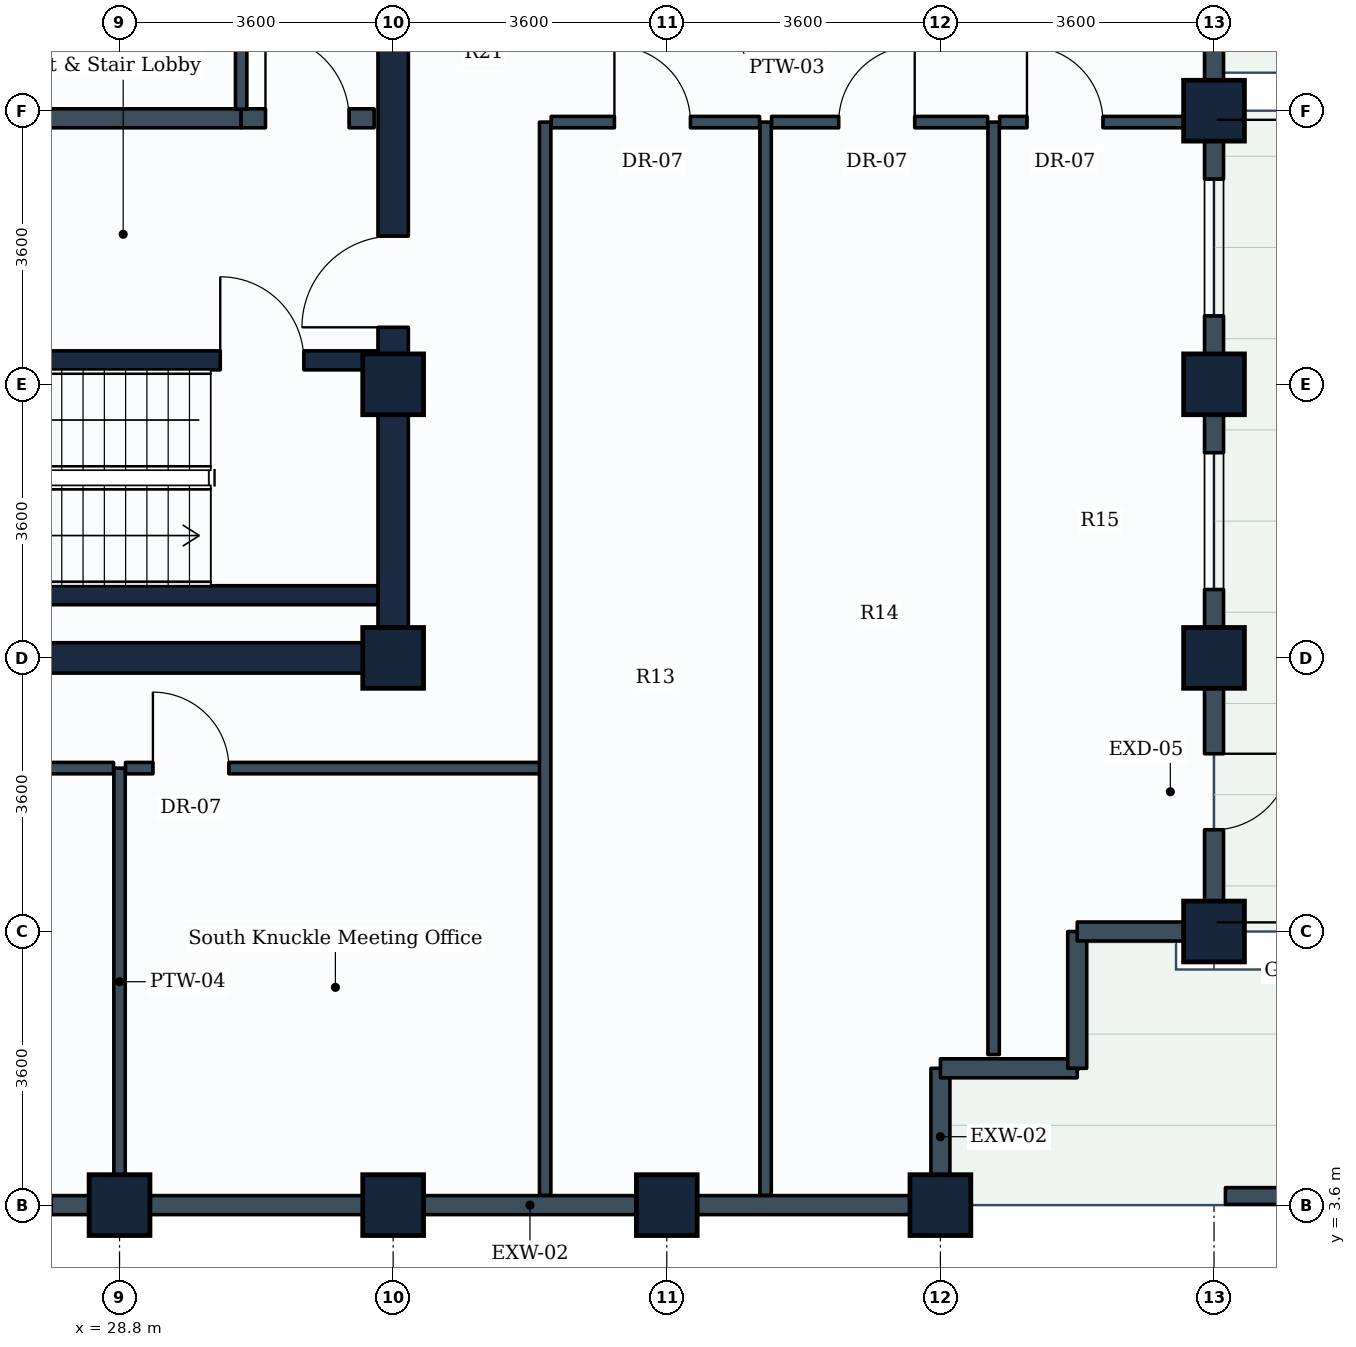
"""IFC4 building model, lengths in metres.
Left out: names, types, materials, properties, quantities, classifications, styles, units other than length and angle.
Written with IfcOpenShell. Run it as: python <this file> out.ifc"""

import sys

from ifc_helpers import new_model, si_unit, direction, frame, frame_2d, origin, origin_2d, place, context, subcontext, project, spatial, rectangle, extrude, element, fill, save


model = new_model("IFC4")
c1 = context("Model", 3, precision=1e-05, world=origin(), true_north=direction((0.0, 1.0)))
c2 = subcontext(c1, "Body", "Model", "MODEL_VIEW")
j1 = project(units=[si_unit("LENGTHUNIT", "METRE"), si_unit("PLANEANGLEUNIT", "RADIAN")], contexts=[c1])
p1 = place(None, origin())
s1 = spatial("IfcSite", under=j1, at=p1, CompositionType="ELEMENT")
p2 = place(p1, origin())
s2 = spatial("IfcBuilding", under=s1, at=p2, CompositionType="ELEMENT")
p3 = place(p2, frame((0.0, 0.0, 221.0)))
s3 = spatial("IfcBuildingStorey", under=s2, at=p3, CompositionType="ELEMENT", Elevation=221.0)
for number, where, z_axis, x_axis in (
    (1, (28.8, 3.6, 0.0), (0.0, 0.0, 1.0), (1.0, 0.0, 0.0)),
    (2, (32.4, 3.6, 0.0), (0.0, 0.0, 1.0), (1.0, 0.0, 0.0)),
    (3, (32.4, 10.8, 0.0), (0.0, 0.0, 1.0), (1.0, 0.0, 0.0)),
    (4, (32.4, 14.4, 0.0), (0.0, 0.0, 1.0), (1.0, 0.0, 0.0)),
    (5, (36.0, 3.6, 0.0), (0.0, 0.0, 1.0), (1.0, 0.0, 0.0)),
    (6, (39.6, 3.6, 0.0), (0.0, 0.0, 1.0), (1.0, 0.0, 0.0)),
    (7, (43.2, 7.2, 0.0), (0.0, 0.0, 1.0), (1.0, 0.0, 0.0)),
    (8, (43.2, 10.8, 0.0), (0.0, 0.0, 1.0), (0.0, 1.0, 0.0)),
    (9, (43.2, 14.4, 0.0), (0.0, 0.0, 1.0), (0.0, 1.0, 0.0)),
    (10, (43.2, 18.0, 0.0), (0.0, 0.0, 1.0), (0.0, 1.0, 0.0)),
):
    element("IfcColumn", number, at=place(p3, frame(where, z_axis=z_axis, x_axis=x_axis)), inside=s3, PredefinedType="COLUMN", context=c2, shape_type="SweptSolid", body=[
        extrude(rectangle(XDim=0.8, YDim=0.8, at=origin_2d()), origin(), (0.0, 0.0, 1.0), 3.6),
    ])
p4 = place(p3, frame((43.35, 3.72, 0.0), z_axis=(0.0, 0.0, 1.0), x_axis=(1.0, 0.0, 0.0)))
e11 = element("IfcWall", 11, at=p4, inside=s3, PredefinedType="PARAPET", context=c2, shape_type="SweptSolid", body=[
    extrude(rectangle(XDim=3.45, YDim=0.22, at=frame_2d((1.725, 0.0))), origin(), (0.0, 0.0, 1.0), 1.15),
])
p5 = place(p3, frame((28.8, 3.6, 0.0), z_axis=(0.0, 0.0, 1.0), x_axis=(-1.0, 0.0, 0.0)))
e12 = element("IfcWall", 12, at=p5, inside=s3, PredefinedType="STANDARD", context=c2, shape_type="SweptSolid", body=[
    extrude(rectangle(XDim=3.6, YDim=0.25, at=frame_2d((1.8, 0.0))), origin(), (0.0, 0.0, 1.0), 2.83),
])
p6 = place(p5, frame((0.9, 0.0, 0.85)))
e13 = element("IfcOpeningElement", 13, at=p6, cuts=e12, PredefinedType="OPENING", context=c2, shape_type="SweptSolid", body=[
    extrude(rectangle(XDim=1.8, YDim=1.35, at=frame_2d((0.9, 0.675))), frame((0.0, 0.135, 0.0), z_axis=(0.0, -1.0, 0.0), x_axis=(1.0, 0.0, 0.0)), (0.0, 0.0, 1.0), 0.27),
])
p7 = place(p3, frame((32.4, 3.6, 0.0), z_axis=(0.0, 0.0, 1.0), x_axis=(-1.0, 0.0, 0.0)))
e14 = element("IfcWall", 14, at=p7, inside=s3, PredefinedType="STANDARD", context=c2, shape_type="SweptSolid", body=[
    extrude(rectangle(XDim=3.6, YDim=0.25, at=frame_2d((1.8, 0.0))), origin(), (0.0, 0.0, 1.0), 2.83),
])
for number, where, z_axis, x_axis in (
    (15, (36.0, 3.6, 0.0), (0.0, 0.0, 1.0), (-1.0, 0.0, 0.0)),
    (16, (39.6, 3.6, 0.0), (0.0, 0.0, 1.0), (-1.0, 0.0, 0.0)),
):
    element("IfcWall", number, at=place(p3, frame(where, z_axis=z_axis, x_axis=x_axis)), inside=s3, PredefinedType="STANDARD", context=c2, shape_type="SweptSolid", body=[
        extrude(rectangle(XDim=3.6, YDim=0.25, at=frame_2d((1.8, 0.0))), origin(), (0.0, 0.0, 1.0), 2.83),
    ])
p8 = place(p3, frame((39.6, 5.4, 0.0), z_axis=(0.0, 0.0, 1.0), x_axis=(0.0, -1.0, 0.0)))
e17 = element("IfcWall", 17, at=p8, inside=s3, PredefinedType="STANDARD", context=c2, shape_type="SweptSolid", body=[
    extrude(rectangle(XDim=1.8, YDim=0.25, at=frame_2d((0.9, 0.0))), origin(), (0.0, 0.0, 1.0), 2.83),
])
p9 = place(p3, frame((41.4, 5.4, 0.0), z_axis=(0.0, 0.0, 1.0), x_axis=(-1.0, 0.0, 0.0)))
e18 = element("IfcWall", 18, at=p9, inside=s3, PredefinedType="STANDARD", context=c2, shape_type="SweptSolid", body=[
    extrude(rectangle(XDim=1.8, YDim=0.25, at=frame_2d((0.9, 0.0))), origin(), (0.0, 0.0, 1.0), 3.335),
])
p10 = place(p3, frame((41.4, 7.2, 0.0), z_axis=(0.0, 0.0, 1.0), x_axis=(0.0, -1.0, 0.0)))
e19 = element("IfcWall", 19, at=p10, inside=s3, PredefinedType="STANDARD", context=c2, shape_type="SweptSolid", body=[
    extrude(rectangle(XDim=1.8, YDim=0.25, at=frame_2d((0.9, 0.0))), origin(), (0.0, 0.0, 1.0), 3.335),
])
p11 = place(p3, frame((43.2, 7.2, 0.0), z_axis=(0.0, 0.0, 1.0), x_axis=(-1.0, 0.0, 0.0)))
e20 = element("IfcWall", 20, at=p11, inside=s3, PredefinedType="STANDARD", context=c2, shape_type="SweptSolid", body=[
    extrude(rectangle(XDim=1.8, YDim=0.25, at=frame_2d((0.9, 0.0))), origin(), (0.0, 0.0, 1.0), 2.83),
])
p12 = place(p3, frame((43.2, 10.8, 0.0), z_axis=(0.0, 0.0, 1.0), x_axis=(0.0, -1.0, 0.0)))
e21 = element("IfcWall", 21, at=p12, inside=s3, PredefinedType="STANDARD", context=c2, shape_type="SweptSolid", body=[
    extrude(rectangle(XDim=3.6, YDim=0.25, at=frame_2d((1.8, 0.0))), origin(), (0.0, 0.0, 1.0), 2.83),
])
p13 = place(p12, frame((1.261, 0.0, 0.0)))
e22 = element("IfcOpeningElement", 22, at=p13, cuts=e21, PredefinedType="OPENING", context=c2, shape_type="SweptSolid", body=[
    extrude(rectangle(XDim=1.0, YDim=2.1, at=frame_2d((0.5, 1.05))), frame((0.0, 0.135, 0.0), z_axis=(0.0, -1.0, 0.0), x_axis=(1.0, 0.0, 0.0)), (0.0, 0.0, 1.0), 0.27),
])
p14 = place(p3, frame((43.2, 14.4, 0.0), z_axis=(0.0, 0.0, 1.0), x_axis=(0.0, -1.0, 0.0)))
e23 = element("IfcWall", 23, at=p14, inside=s3, PredefinedType="STANDARD", context=c2, shape_type="SweptSolid", body=[
    extrude(rectangle(XDim=3.6, YDim=0.25, at=frame_2d((1.8, 0.0))), origin(), (0.0, 0.0, 1.0), 2.83),
])
p15 = place(p14, frame((0.9, 0.0, 0.85)))
e24 = element("IfcOpeningElement", 24, at=p15, cuts=e23, PredefinedType="OPENING", context=c2, shape_type="SweptSolid", body=[
    extrude(rectangle(XDim=1.8, YDim=1.35, at=frame_2d((0.9, 0.675))), frame((0.0, 0.135, 0.0), z_axis=(0.0, -1.0, 0.0), x_axis=(1.0, 0.0, 0.0)), (0.0, 0.0, 1.0), 0.27),
])
p16 = place(p3, frame((43.2, 18.0, 0.0), z_axis=(0.0, 0.0, 1.0), x_axis=(0.0, -1.0, 0.0)))
e25 = element("IfcWall", 25, at=p16, inside=s3, PredefinedType="STANDARD", context=c2, shape_type="SweptSolid", body=[
    extrude(rectangle(XDim=3.6, YDim=0.25, at=frame_2d((1.8, 0.0))), origin(), (0.0, 0.0, 1.0), 2.83),
])
p17 = place(p16, frame((0.9, 0.0, 0.85)))
e26 = element("IfcOpeningElement", 26, at=p17, cuts=e25, PredefinedType="OPENING", context=c2, shape_type="SweptSolid", body=[
    extrude(rectangle(XDim=1.8, YDim=1.35, at=frame_2d((0.9, 0.675))), frame((0.0, 0.135, 0.0), z_axis=(0.0, -1.0, 0.0), x_axis=(1.0, 0.0, 0.0)), (0.0, 0.0, 1.0), 0.27),
])
p18 = place(p3, frame((43.2, 21.6, 0.0), z_axis=(0.0, 0.0, 1.0), x_axis=(0.0, -1.0, 0.0)))
e27 = element("IfcWall", 27, at=p18, inside=s3, PredefinedType="STANDARD", context=c2, shape_type="SweptSolid", body=[
    extrude(rectangle(XDim=3.6, YDim=0.25, at=frame_2d((1.8, 0.0))), origin(), (0.0, 0.0, 1.0), 2.83),
])
p19 = place(p3, frame((14.4, 10.8, 0.0), z_axis=(0.0, 0.0, 1.0), x_axis=(1.0, 0.0, 0.0)))
e28 = element("IfcWall", 28, at=p19, inside=s3, PredefinedType="SHEAR", context=c2, shape_type="SweptSolid", body=[
    extrude(rectangle(XDim=18.0, YDim=0.4, at=frame_2d((9.0, 0.0))), origin(), (0.0, 0.0, 1.0), 3.35),
])
p20 = place(p3, frame((32.4, 10.8, 0.0), z_axis=(0.0, 0.0, 1.0), x_axis=(0.0, 1.0, 0.0)))
e29 = element("IfcWall", 29, at=p20, inside=s3, PredefinedType="SHEAR", context=c2, shape_type="SweptSolid", body=[
    extrude(rectangle(XDim=14.4, YDim=0.4, at=frame_2d((7.2, 0.0))), origin(), (0.0, 0.0, 1.0), 3.35),
])
p21 = place(p20, frame((4.35, 0.0, 0.0)))
e30 = element("IfcOpeningElement", 30, at=p21, cuts=e29, PredefinedType="OPENING", context=c2, shape_type="SweptSolid", body=[
    extrude(rectangle(XDim=1.2, YDim=2.1, at=frame_2d((0.6, 1.05))), frame((0.0, 0.21, 0.0), z_axis=(0.0, -1.0, 0.0), x_axis=(1.0, 0.0, 0.0)), (0.0, 0.0, 1.0), 0.42),
])
p22 = place(p20, frame((10.0, 0.0, 0.0)))
e31 = element("IfcOpeningElement", 31, at=p22, cuts=e29, PredefinedType="OPENING", context=c2, shape_type="SweptSolid", body=[
    extrude(rectangle(XDim=1.2, YDim=2.1, at=frame_2d((0.6, 1.05))), frame((0.0, 0.21, 0.0), z_axis=(0.0, -1.0, 0.0), x_axis=(1.0, 0.0, 0.0)), (0.0, 0.0, 1.0), 0.42),
])
p23 = place(p3, frame((23.35, 11.625, 0.0), z_axis=(0.0, 0.0, 1.0), x_axis=(1.0, 0.0, 0.0)))
e32 = element("IfcWall", 32, at=p23, inside=s3, PredefinedType="SHEAR", context=c2, shape_type="SweptSolid", body=[
    extrude(rectangle(XDim=8.85, YDim=0.25, at=frame_2d((4.425, 0.0))), origin(), (0.0, 0.0, 1.0), 3.35),
])
p24 = place(p3, frame((23.35, 14.715, 0.0), z_axis=(0.0, 0.0, 1.0), x_axis=(1.0, 0.0, 0.0)))
e33 = element("IfcWall", 33, at=p24, inside=s3, PredefinedType="SHEAR", context=c2, shape_type="SweptSolid", body=[
    extrude(rectangle(XDim=8.85, YDim=0.25, at=frame_2d((4.425, 0.0))), origin(), (0.0, 0.0, 1.0), 3.35),
])
p25 = place(p24, frame((6.775, 0.0, 0.0)))
e34 = element("IfcOpeningElement", 34, at=p25, cuts=e33, PredefinedType="OPENING", context=c2, shape_type="SweptSolid", body=[
    extrude(rectangle(XDim=1.1, YDim=2.1, at=frame_2d((0.55, 1.05))), frame((0.0, 0.135, 0.0), z_axis=(0.0, -1.0, 0.0), x_axis=(1.0, 0.0, 0.0)), (0.0, 0.0, 1.0), 0.27),
])
p26 = place(p3, frame((21.88, 17.9, 0.0), z_axis=(0.0, 0.0, 1.0), x_axis=(1.0, 0.0, 0.0)))
e35 = element("IfcWall", 35, at=p26, inside=s3, PredefinedType="PARTITIONING", context=c2, shape_type="SweptSolid", body=[
    extrude(rectangle(XDim=8.52, YDim=0.25, at=frame_2d((4.26, 0.0))), origin(), (0.0, 0.0, 1.0), 3.335),
])
p27 = place(p3, frame((30.4, 17.9, 0.0), z_axis=(0.0, 0.0, 1.0), x_axis=(1.0, 0.0, 0.0)))
e36 = element("IfcWall", 36, at=p27, inside=s3, PredefinedType="PARTITIONING", context=c2, shape_type="SweptSolid", body=[
    extrude(rectangle(XDim=1.75, YDim=0.25, at=frame_2d((0.875, 0.0))), origin(), (0.0, 0.0, 1.0), 3.335),
])
p28 = place(p27, frame((0.32, 0.0, 0.0)))
e37 = element("IfcOpeningElement", 37, at=p28, cuts=e36, PredefinedType="OPENING", context=c2, shape_type="SweptSolid", body=[
    extrude(rectangle(XDim=1.1, YDim=2.1, at=frame_2d((0.55, 1.05))), frame((0.0, 0.135, 0.0), z_axis=(0.0, -1.0, 0.0), x_axis=(1.0, 0.0, 0.0)), (0.0, 0.0, 1.0), 0.27),
])
p29 = place(p3, frame((30.4, 18.02, 0.0), z_axis=(0.0, 0.0, 1.0), x_axis=(0.0, 1.0, 0.0)))
e38 = element("IfcWall", 38, at=p29, inside=s3, PredefinedType="PARTITIONING", context=c2, shape_type="SweptSolid", body=[
    extrude(rectangle(XDim=3.2, YDim=0.15, at=frame_2d((1.6, 0.0))), origin(), (0.0, 0.0, 1.0), 3.335),
])
p30 = place(p3, frame((28.8, 9.35, 0.0), z_axis=(0.0, 0.0, 1.0), x_axis=(0.0, -1.0, 0.0)))
e39 = element("IfcWall", 39, at=p30, inside=s3, PredefinedType="PARTITIONING", context=c2, shape_type="SweptSolid", body=[
    extrude(rectangle(XDim=5.621, YDim=0.15, at=frame_2d((2.811, 0.0))), origin(), (0.0, 0.0, 1.0), 3.335),
])
p31 = place(p3, frame((20.479, 9.35, 0.0), z_axis=(0.0, 0.0, 1.0), x_axis=(1.0, 0.0, 0.0)))
e40 = element("IfcWall", 40, at=p31, inside=s3, PredefinedType="PARTITIONING", context=c2, shape_type="SweptSolid", body=[
    extrude(rectangle(XDim=8.242, YDim=0.15, at=frame_2d((4.121, 0.0))), origin(), (0.0, 0.0, 1.0), 3.02),
])
p32 = place(p31, frame((3.939, 0.0, 0.0)))
e41 = element("IfcOpeningElement", 41, at=p32, cuts=e40, PredefinedType="OPENING", context=c2, shape_type="SweptSolid", body=[
    extrude(rectangle(XDim=1.0, YDim=2.1, at=frame_2d((0.5, 1.05))), frame((0.0, 0.085, 0.0), z_axis=(0.0, -1.0, 0.0), x_axis=(1.0, 0.0, 0.0)), (0.0, 0.0, 1.0), 0.17),
])
p33 = place(p3, frame((28.879, 9.35, 0.0), z_axis=(0.0, 0.0, 1.0), x_axis=(1.0, 0.0, 0.0)))
e42 = element("IfcWall", 42, at=p33, inside=s3, PredefinedType="PARTITIONING", context=c2, shape_type="SweptSolid", body=[
    extrude(rectangle(XDim=5.521, YDim=0.15, at=frame_2d((2.76, 0.0))), origin(), (0.0, 0.0, 1.0), 3.335),
])
p34 = place(p33, frame((0.36, 0.0, 0.0)))
e43 = element("IfcOpeningElement", 43, at=p34, cuts=e42, PredefinedType="OPENING", context=c2, shape_type="SweptSolid", body=[
    extrude(rectangle(XDim=1.0, YDim=2.1, at=frame_2d((0.5, 1.05))), frame((0.0, 0.085, 0.0), z_axis=(0.0, -1.0, 0.0), x_axis=(1.0, 0.0, 0.0)), (0.0, 0.0, 1.0), 0.17),
])
for number, where, z_axis, x_axis in (
    (44, (34.4, 3.729, 0.0), (0.0, 0.0, 1.0), (0.0, 1.0, 0.0)),
    (45, (37.3, 3.729, 0.0), (0.0, 0.0, 1.0), (0.0, 1.0, 0.0)),
):
    element("IfcWall", number, at=place(p3, frame(where, z_axis=z_axis, x_axis=x_axis)), inside=s3, PredefinedType="PARTITIONING", context=c2, shape_type="SweptSolid", body=[
        extrude(rectangle(XDim=14.121, YDim=0.15, at=frame_2d((7.061, 0.0))), origin(), (0.0, 0.0, 1.0), 2.83),
    ])
p35 = place(p3, frame((34.479, 17.85, 0.0), z_axis=(0.0, 0.0, 1.0), x_axis=(1.0, 0.0, 0.0)))
e46 = element("IfcWall", 46, at=p35, inside=s3, PredefinedType="PARTITIONING", context=c2, shape_type="SweptSolid", body=[
    extrude(rectangle(XDim=2.742, YDim=0.15, at=frame_2d((1.371, 0.0))), origin(), (0.0, 0.0, 1.0), 3.02),
])
p36 = place(p35, frame((0.832, 0.0, 0.0)))
e47 = element("IfcOpeningElement", 47, at=p36, cuts=e46, PredefinedType="OPENING", context=c2, shape_type="SweptSolid", body=[
    extrude(rectangle(XDim=1.0, YDim=2.1, at=frame_2d((0.5, 1.05))), frame((0.0, 0.085, 0.0), z_axis=(0.0, -1.0, 0.0), x_axis=(1.0, 0.0, 0.0)), (0.0, 0.0, 1.0), 0.17),
])
p37 = place(p3, frame((40.3, 5.58, 0.0), z_axis=(0.0, 0.0, 1.0), x_axis=(0.0, 1.0, 0.0)))
e48 = element("IfcWall", 48, at=p37, inside=s3, PredefinedType="PARTITIONING", context=c2, shape_type="SweptSolid", body=[
    extrude(rectangle(XDim=12.27, YDim=0.15, at=frame_2d((6.135, 0.0))), origin(), (0.0, 0.0, 1.0), 3.03),
])
p38 = place(p3, frame((37.379, 17.85, 0.0), z_axis=(0.0, 0.0, 1.0), x_axis=(1.0, 0.0, 0.0)))
e49 = element("IfcWall", 49, at=p38, inside=s3, PredefinedType="PARTITIONING", context=c2, shape_type="SweptSolid", body=[
    extrude(rectangle(XDim=2.842, YDim=0.15, at=frame_2d((1.421, 0.0))), origin(), (0.0, 0.0, 1.0), 3.335),
])
p39 = place(p38, frame((0.883, 0.0, 0.0)))
e50 = element("IfcOpeningElement", 50, at=p39, cuts=e49, PredefinedType="OPENING", context=c2, shape_type="SweptSolid", body=[
    extrude(rectangle(XDim=1.0, YDim=2.1, at=frame_2d((0.5, 1.05))), frame((0.0, 0.085, 0.0), z_axis=(0.0, -1.0, 0.0), x_axis=(1.0, 0.0, 0.0)), (0.0, 0.0, 1.0), 0.17),
])
p40 = place(p3, frame((40.379, 17.85, 0.0), z_axis=(0.0, 0.0, 1.0), x_axis=(1.0, 0.0, 0.0)))
e51 = element("IfcWall", 51, at=p40, inside=s3, PredefinedType="PARTITIONING", context=c2, shape_type="SweptSolid", body=[
    extrude(rectangle(XDim=2.692, YDim=0.15, at=frame_2d((1.346, 0.0))), origin(), (0.0, 0.0, 1.0), 2.83),
])
p41 = place(p40, frame((0.36, 0.0, 0.0)))
e52 = element("IfcOpeningElement", 52, at=p41, cuts=e51, PredefinedType="OPENING", context=c2, shape_type="SweptSolid", body=[
    extrude(rectangle(XDim=1.0, YDim=2.1, at=frame_2d((0.5, 1.05))), frame((0.0, 0.085, 0.0), z_axis=(0.0, -1.0, 0.0), x_axis=(1.0, 0.0, 0.0)), (0.0, 0.0, 1.0), 0.17),
])
p42 = place(p13, origin())
e53 = element("IfcDoor", 53, at=p42, inside=s3, OperationType="SINGLE_SWING_LEFT", PredefinedType="DOOR", context=c2, shape_type="SweptSolid", body=[
    extrude(rectangle(XDim=1.0, YDim=2.1, at=frame_2d((0.5, 1.05))), frame((0.0, 0.025, 0.0), z_axis=(0.0, -1.0, 0.0), x_axis=(1.0, 0.0, 0.0)), (0.0, 0.0, 1.0), 0.05),
])
fill(e22, e53)
p43 = place(p15, origin())
e54 = element("IfcWindow", 54, at=p43, inside=s3, PartitioningType="SINGLE_PANEL", PredefinedType="WINDOW", context=c2, shape_type="SweptSolid", body=[
    extrude(rectangle(XDim=1.8, YDim=1.35, at=frame_2d((0.9, 0.675))), frame((0.0, 0.03, 0.0), z_axis=(0.0, -1.0, 0.0), x_axis=(1.0, 0.0, 0.0)), (0.0, 0.0, 1.0), 0.06),
])
fill(e24, e54)
p44 = place(p17, origin())
e55 = element("IfcWindow", 55, at=p44, inside=s3, PartitioningType="SINGLE_PANEL", PredefinedType="WINDOW", context=c2, shape_type="SweptSolid", body=[
    extrude(rectangle(XDim=1.8, YDim=1.35, at=frame_2d((0.9, 0.675))), frame((0.0, 0.03, 0.0), z_axis=(0.0, -1.0, 0.0), x_axis=(1.0, 0.0, 0.0)), (0.0, 0.0, 1.0), 0.06),
])
fill(e26, e55)
p45 = place(p25, origin())
e56 = element("IfcDoor", 56, at=p45, inside=s3, OperationType="SINGLE_SWING_LEFT", PredefinedType="DOOR", context=c2, shape_type="SweptSolid", body=[
    extrude(rectangle(XDim=1.1, YDim=2.1, at=frame_2d((0.55, 1.05))), frame((0.0, 0.025, 0.0), z_axis=(0.0, -1.0, 0.0), x_axis=(1.0, 0.0, 0.0)), (0.0, 0.0, 1.0), 0.05),
])
fill(e34, e56)
p46 = place(p21, origin())
e57 = element("IfcDoor", 57, at=p46, inside=s3, OperationType="SINGLE_SWING_LEFT", PredefinedType="DOOR", context=c2, shape_type="SweptSolid", body=[
    extrude(rectangle(XDim=1.2, YDim=2.1, at=frame_2d((0.6, 1.05))), frame((0.0, 0.025, 0.0), z_axis=(0.0, -1.0, 0.0), x_axis=(1.0, 0.0, 0.0)), (0.0, 0.0, 1.0), 0.05),
])
fill(e30, e57)
p47 = place(p28, origin())
e58 = element("IfcDoor", 58, at=p47, inside=s3, OperationType="SINGLE_SWING_LEFT", PredefinedType="DOOR", context=c2, shape_type="SweptSolid", body=[
    extrude(rectangle(XDim=1.1, YDim=2.1, at=frame_2d((0.55, 1.05))), frame((0.0, 0.025, 0.0), z_axis=(0.0, -1.0, 0.0), x_axis=(1.0, 0.0, 0.0)), (0.0, 0.0, 1.0), 0.05),
])
fill(e37, e58)
p48 = place(p34, origin())
e59 = element("IfcDoor", 59, at=p48, inside=s3, OperationType="SINGLE_SWING_LEFT", PredefinedType="DOOR", context=c2, shape_type="SweptSolid", body=[
    extrude(rectangle(XDim=1.0, YDim=2.1, at=frame_2d((0.5, 1.05))), frame((0.0, 0.025, 0.0), z_axis=(0.0, -1.0, 0.0), x_axis=(1.0, 0.0, 0.0)), (0.0, 0.0, 1.0), 0.05),
])
fill(e43, e59)
p49 = place(p36, origin())
e60 = element("IfcDoor", 60, at=p49, inside=s3, OperationType="SINGLE_SWING_LEFT", PredefinedType="DOOR", context=c2, shape_type="SweptSolid", body=[
    extrude(rectangle(XDim=1.0, YDim=2.1, at=frame_2d((0.5, 1.05))), frame((0.0, 0.025, 0.0), z_axis=(0.0, -1.0, 0.0), x_axis=(1.0, 0.0, 0.0)), (0.0, 0.0, 1.0), 0.05),
])
fill(e47, e60)
p50 = place(p39, origin())
e61 = element("IfcDoor", 61, at=p50, inside=s3, OperationType="SINGLE_SWING_RIGHT", PredefinedType="DOOR", context=c2, shape_type="SweptSolid", body=[
    extrude(rectangle(XDim=1.0, YDim=2.1, at=frame_2d((0.5, 1.05))), frame((0.0, 0.025, 0.0), z_axis=(0.0, -1.0, 0.0), x_axis=(1.0, 0.0, 0.0)), (0.0, 0.0, 1.0), 0.05),
])
fill(e50, e61)
p51 = place(p41, origin())
e62 = element("IfcDoor", 62, at=p51, inside=s3, OperationType="SINGLE_SWING_LEFT", PredefinedType="DOOR", context=c2, shape_type="SweptSolid", body=[
    extrude(rectangle(XDim=1.0, YDim=2.1, at=frame_2d((0.5, 1.05))), frame((0.0, 0.025, 0.0), z_axis=(0.0, -1.0, 0.0), x_axis=(1.0, 0.0, 0.0)), (0.0, 0.0, 1.0), 0.05),
])
fill(e52, e62)
save(model, sys.argv[1])
